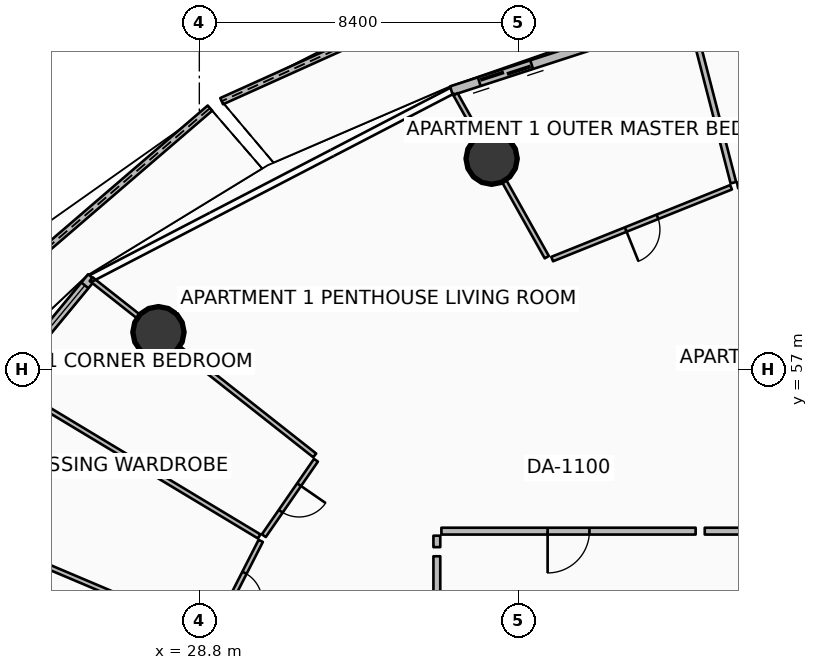
"""IFC4 building model, lengths in metres.
Left out: names, types, materials, properties, quantities, classifications, styles, units other than length and angle.
Written with IfcOpenShell. Run it as: python <this file> out.ifc"""

import sys

from ifc_helpers import new_model, si_unit, direction, frame, frame_2d, origin, origin_2d, place, context, subcontext, project, spatial, polyline, rectangle, circle, outline, extrude, element, fill, save


model = new_model("IFC4")
c1 = context("Model", 3, precision=1e-05, world=origin(), true_north=direction((0.0, 1.0)))
c2 = subcontext(c1, "Body", "Model", "MODEL_VIEW")
j1 = project(units=[si_unit("LENGTHUNIT", "METRE"), si_unit("PLANEANGLEUNIT", "RADIAN")], contexts=[c1])
p1 = place(None, origin())
s1 = spatial("IfcSite", under=j1, at=p1, CompositionType="ELEMENT")
p2 = place(p1, origin())
s2 = spatial("IfcBuilding", under=s1, at=p2, CompositionType="ELEMENT")
p3 = place(p2, frame((0.0, 0.0, 30.15)))
s3 = spatial("IfcBuildingStorey", under=s2, at=p3, CompositionType="ELEMENT", Elevation=30.15)
for number, where, z_axis, x_axis in (
    (1, (36.492, 62.55, 0.0), (0.0, 0.0, 1.0), (1.0, 0.0, 0.0)),
    (2, (27.724, 57.984, 0.0), (0.0, 0.0, 1.0), (1.0, 0.0, 0.0)),
):
    element("IfcColumn", number, at=place(p3, frame(where, z_axis=z_axis, x_axis=x_axis)), inside=s3, PredefinedType="COLUMN", context=c2, shape_type="SweptSolid", body=[
        extrude(circle(Radius=0.675, at=origin_2d()), origin(), (0.0, 0.0, 1.0), 3.5),
    ])
p4 = place(p3, frame((39.26, 68.514, 0.0), z_axis=(0.0, 0.0, 1.0), x_axis=(-0.911628502068, -0.411015175167, 0.0)))
e3 = element("IfcWall", 3, at=p4, inside=s3, PredefinedType="PARAPET", context=c2, shape_type="SweptSolid", body=[
    extrude(outline(polyline([(0.0, 0.0), (10.829, 0.0), (10.829, 1.497), (5.414, 1.696), (0.0, 1.832), (0.0, 0.0)])), frame((0.0, 0.09, 0.0), z_axis=(0.0, -1.0, 0.0), x_axis=(1.0, 0.0, 0.0)), (0.0, 0.0, 1.0), 0.18),
])
p5 = place(p3, frame((29.08, 63.881, 0.0), z_axis=(0.0, 0.0, 1.0), x_axis=(-0.758371329303, -0.651822772609, 0.0)))
e4 = element("IfcWall", 4, at=p5, inside=s3, PredefinedType="PARAPET", context=c2, shape_type="SweptSolid", body=[
    extrude(outline(polyline([(0.0, 0.0), (11.67, 0.0), (11.67, 1.148), (5.835, 1.284), (0.0, 1.483), (0.0, 0.0)])), frame((0.0, 0.09, 0.0), z_axis=(0.0, -1.0, 0.0), x_axis=(1.0, 0.0, 0.0)), (0.0, 0.0, 1.0), 0.18),
])
p6 = place(p3, frame((45.036, 67.458, 0.0), z_axis=(0.0, 0.0, 1.0), x_axis=(-0.951054679225, -0.309022648238, 0.0)))
e5 = element("IfcWall", 5, at=p6, inside=s3, PredefinedType="SOLIDWALL", context=c2, shape_type="SweptSolid", body=[
    extrude(rectangle(XDim=10.097, YDim=0.24, at=frame_2d((5.048, 0.0))), origin(), (0.0, 0.0, 1.0), 2.45),
])
p7 = place(p6, frame((7.877, 0.0, 0.0)))
e6 = element("IfcOpeningElement", 6, at=p7, cuts=e5, PredefinedType="OPENING", context=c2, shape_type="SweptSolid", body=[
    extrude(rectangle(XDim=1.45, YDim=2.15, at=frame_2d((0.725, 1.075))), frame((0.0, 0.13, 0.0), z_axis=(0.0, -1.0, 0.0), x_axis=(1.0, 0.0, 0.0)), (0.0, 0.0, 1.0), 0.26),
])
p8 = place(p6, frame((0.28, 0.0, 0.65)))
e7 = element("IfcOpeningElement", 7, at=p8, cuts=e5, PredefinedType="OPENING", context=c2, shape_type="SweptSolid", body=[
    extrude(rectangle(XDim=1.6, YDim=1.5, at=frame_2d((0.8, 0.75))), frame((0.0, 0.13, 0.0), z_axis=(0.0, -1.0, 0.0), x_axis=(1.0, 0.0, 0.0)), (0.0, 0.0, 1.0), 0.26),
])
p9 = place(p3, frame((25.967, 59.433, 0.0), z_axis=(0.0, 0.0, 1.0), x_axis=(-0.636674332663, -0.771132799281, 0.0)))
e8 = element("IfcWall", 8, at=p9, inside=s3, PredefinedType="SOLIDWALL", context=c2, shape_type="SweptSolid", body=[
    extrude(rectangle(XDim=11.851, YDim=0.24, at=frame_2d((5.926, 0.0))), origin(), (0.0, 0.0, 1.0), 2.45),
])
p10 = place(p9, frame((9.631, 0.0, 0.0)))
e9 = element("IfcOpeningElement", 9, at=p10, cuts=e8, PredefinedType="OPENING", context=c2, shape_type="SweptSolid", body=[
    extrude(rectangle(XDim=1.45, YDim=2.15, at=frame_2d((0.725, 1.075))), frame((0.0, 0.13, 0.0), z_axis=(0.0, -1.0, 0.0), x_axis=(1.0, 0.0, 0.0)), (0.0, 0.0, 1.0), 0.26),
])
p11 = place(p9, frame((0.28, 0.0, 0.65)))
e10 = element("IfcOpeningElement", 10, at=p11, cuts=e8, PredefinedType="OPENING", context=c2, shape_type="SweptSolid", body=[
    extrude(rectangle(XDim=1.6, YDim=1.5, at=frame_2d((0.8, 0.75))), frame((0.0, 0.13, 0.0), z_axis=(0.0, -1.0, 0.0), x_axis=(1.0, 0.0, 0.0)), (0.0, 0.0, 1.0), 0.26),
])
p12 = place(p3, frame((41.86, 52.75, 0.0), z_axis=(0.0, 0.0, 1.0), x_axis=(-1.0, 0.0, 0.0)))
e11 = element("IfcWall", 11, at=p12, inside=s3, PredefinedType="PARTITIONING", context=c2, shape_type="SweptSolid", body=[
    extrude(rectangle(XDim=6.69, YDim=0.18, at=frame_2d((3.345, 0.0))), origin(), (0.0, 0.0, 1.0), 2.867),
])
p13 = place(p12, frame((2.795, 0.0, 0.0)))
e12 = element("IfcOpeningElement", 12, at=p13, cuts=e11, PredefinedType="OPENING", context=c2, shape_type="SweptSolid", body=[
    extrude(rectangle(XDim=1.1, YDim=2.1, at=frame_2d((0.55, 1.05))), frame((0.0, 0.1, 0.0), z_axis=(0.0, -1.0, 0.0), x_axis=(1.0, 0.0, 0.0)), (0.0, 0.0, 1.0), 0.2),
])
p14 = place(p3, frame((35.05, 52.63, 0.0), z_axis=(0.0, 0.0, 1.0), x_axis=(0.0, -1.0, 0.0)))
e13 = element("IfcWall", 13, at=p14, inside=s3, PredefinedType="PARTITIONING", context=c2, shape_type="SweptSolid", body=[
    extrude(rectangle(XDim=0.301, YDim=0.18, at=frame_2d((0.15, 0.0))), origin(), (0.0, 0.0, 1.0), 2.867),
])
p15 = place(p3, frame((46.608, 52.75, 0.0), z_axis=(0.0, 0.0, 1.0), x_axis=(-1.0, 0.0, 0.0)))
e14 = element("IfcWall", 14, at=p15, inside=s3, PredefinedType="PARTITIONING", context=c2, shape_type="SweptSolid", body=[
    extrude(rectangle(XDim=4.508, YDim=0.18, at=frame_2d((2.254, 0.0))), origin(), (0.0, 0.0, 1.0), 2.867),
])
p16 = place(p3, frame((37.943, 59.958, 0.0), z_axis=(0.0, 0.0, 1.0), x_axis=(-0.488606395453, 0.872504321091, 0.0)))
e15 = element("IfcWall", 15, at=p16, inside=s3, PredefinedType="PARTITIONING", context=c2, shape_type="SweptSolid", body=[
    extrude(rectangle(XDim=4.913, YDim=0.125, at=frame_2d((2.457, 0.0))), origin(), (0.0, 0.0, 1.0), 2.867),
])
p17 = place(p3, frame((45.494, 62.323, 0.0), z_axis=(0.0, 0.0, 1.0), x_axis=(-0.982882919375, -0.184231286161, 0.0)))
e16 = element("IfcWall", 16, at=p17, inside=s3, PredefinedType="PARTITIONING", context=c2, shape_type="SweptSolid", body=[
    extrude(rectangle(XDim=2.575, YDim=0.15, at=frame_2d((1.288, 0.0))), origin(), (0.0, 0.0, 1.0), 2.867),
])
p18 = place(p17, frame((0.862, 0.0, 0.0)))
e17 = element("IfcOpeningElement", 17, at=p18, cuts=e16, PredefinedType="OPENING", context=c2, shape_type="SweptSolid", body=[
    extrude(rectangle(XDim=0.85, YDim=2.06, at=frame_2d((0.425, 1.03))), frame((0.0, 0.085, 0.0), z_axis=(0.0, -1.0, 0.0), x_axis=(1.0, 0.0, 0.0)), (0.0, 0.0, 1.0), 0.17),
])
p19 = place(p3, frame((42.852, 61.919, 0.0), z_axis=(0.0, 0.0, 1.0), x_axis=(-0.250174852853, 0.968200672898, 0.0)))
e18 = element("IfcWall", 18, at=p19, inside=s3, PredefinedType="PARTITIONING", context=c2, shape_type="SweptSolid", body=[
    extrude(rectangle(XDim=4.477, YDim=0.15, at=frame_2d((2.239, 0.0))), origin(), (0.0, 0.0, 1.0), 2.94),
])
p20 = place(p3, frame((42.792, 61.798, 0.0), z_axis=(0.0, 0.0, 1.0), x_axis=(-0.928027868691, -0.372510771566, 0.0)))
e19 = element("IfcWall", 19, at=p20, inside=s3, PredefinedType="PARTITIONING", context=c2, shape_type="SweptSolid", body=[
    extrude(rectangle(XDim=5.072, YDim=0.125, at=frame_2d((2.536, 0.0))), origin(), (0.0, 0.0, 1.0), 2.867),
])
p21 = place(p20, frame((2.086, 0.0, 0.0)))
e20 = element("IfcOpeningElement", 20, at=p21, cuts=e19, PredefinedType="OPENING", context=c2, shape_type="SweptSolid", body=[
    extrude(rectangle(XDim=0.9, YDim=2.08, at=frame_2d((0.45, 1.04))), frame((0.0, 0.073, 0.0), z_axis=(0.0, -1.0, 0.0), x_axis=(1.0, 0.0, 0.0)), (0.0, 0.0, 1.0), 0.145),
])
p22 = place(p3, frame((35.05, 52.089, 0.0), z_axis=(0.0, 0.0, 1.0), x_axis=(0.0, -1.0, 0.0)))
e21 = element("IfcWall", 21, at=p22, inside=s3, PredefinedType="PARTITIONING", context=c2, shape_type="SweptSolid", body=[
    extrude(rectangle(XDim=6.317, YDim=0.18, at=frame_2d((3.158, 0.0))), origin(), (0.0, 0.0, 1.0), 2.867),
])
p23 = place(p3, frame((31.836, 54.743, 0.0), z_axis=(0.0, 0.0, 1.0), x_axis=(-0.785333171854, 0.619073347178, 0.0)))
e22 = element("IfcWall", 22, at=p23, inside=s3, PredefinedType="PARTITIONING", context=c2, shape_type="SweptSolid", body=[
    extrude(rectangle(XDim=7.489, YDim=0.125, at=frame_2d((3.745, 0.0))), origin(), (0.0, 0.0, 1.0), 2.867),
])
p24 = place(p3, frame((30.375, 52.611, 0.0), z_axis=(0.0, 0.0, 1.0), x_axis=(-0.856697740307, 0.515818748936, 0.0)))
e23 = element("IfcWall", 23, at=p24, inside=s3, PredefinedType="PARTITIONING", context=c2, shape_type="SweptSolid", body=[
    extrude(rectangle(XDim=7.704, YDim=0.125, at=frame_2d((3.852, 0.0))), origin(), (0.0, 0.0, 1.0), 2.94),
])
p25 = place(p3, frame((29.055, 50.022, 0.0), z_axis=(0.0, 0.0, 1.0), x_axis=(-0.920841617163, 0.389936810395, 0.0)))
e24 = element("IfcWall", 24, at=p25, inside=s3, PredefinedType="PARTITIONING", context=c2, shape_type="SweptSolid", body=[
    extrude(rectangle(XDim=8.613, YDim=0.125, at=frame_2d((4.306, 0.0))), origin(), (0.0, 0.0, 1.0), 2.94),
])
p26 = place(p3, frame((31.869, 54.615, 0.0), z_axis=(0.0, 0.0, 1.0), x_axis=(-0.568588801709, -0.822621890404, 0.0)))
e25 = element("IfcWall", 25, at=p26, inside=s3, PredefinedType="PARTITIONING", context=c2, shape_type="SweptSolid", body=[
    extrude(rectangle(XDim=2.412, YDim=0.125, at=frame_2d((1.206, 0.0))), origin(), (0.0, 0.0, 1.0), 2.867),
])
p27 = place(p26, frame((0.781, 0.0, 0.0)))
e26 = element("IfcOpeningElement", 26, at=p27, cuts=e25, PredefinedType="OPENING", context=c2, shape_type="SweptSolid", body=[
    extrude(rectangle(XDim=0.85, YDim=2.06, at=frame_2d((0.425, 1.03))), frame((0.0, 0.073, 0.0), z_axis=(0.0, -1.0, 0.0), x_axis=(1.0, 0.0, 0.0)), (0.0, 0.0, 1.0), 0.145),
])
p28 = place(p3, frame((30.416, 52.493, 0.0), z_axis=(0.0, 0.0, 1.0), x_axis=(-0.454024795493, -0.890989048798, 0.0)))
e27 = element("IfcWall", 27, at=p28, inside=s3, PredefinedType="PARTITIONING", context=c2, shape_type="SweptSolid", body=[
    extrude(rectangle(XDim=2.733, YDim=0.125, at=frame_2d((1.367, 0.0))), origin(), (0.0, 0.0, 1.0), 2.94),
])
p29 = place(p28, frame((0.942, 0.0, 0.0)))
e28 = element("IfcOpeningElement", 28, at=p29, cuts=e27, PredefinedType="OPENING", context=c2, shape_type="SweptSolid", body=[
    extrude(rectangle(XDim=0.85, YDim=2.06, at=frame_2d((0.425, 1.03))), frame((0.0, 0.073, 0.0), z_axis=(0.0, -1.0, 0.0), x_axis=(1.0, 0.0, 0.0)), (0.0, 0.0, 1.0), 0.145),
])
p30 = place(p7, origin())
e29 = element("IfcDoor", 29, at=p30, inside=s3, OperationType="DOUBLE_DOOR_SLIDING", PredefinedType="DOOR", context=c2, shape_type="SweptSolid", body=[
    extrude(rectangle(XDim=1.45, YDim=2.15, at=frame_2d((0.725, 1.075))), frame((0.0, 0.025, 0.0), z_axis=(0.0, -1.0, 0.0), x_axis=(1.0, 0.0, 0.0)), (0.0, 0.0, 1.0), 0.05),
])
fill(e6, e29)
p31 = place(p11, origin())
e30 = element("IfcWindow", 30, at=p31, inside=s3, PartitioningType="SINGLE_PANEL", PredefinedType="WINDOW", context=c2, shape_type="SweptSolid", body=[
    extrude(rectangle(XDim=1.6, YDim=1.5, at=frame_2d((0.8, 0.75))), frame((0.0, 0.03, 0.0), z_axis=(0.0, -1.0, 0.0), x_axis=(1.0, 0.0, 0.0)), (0.0, 0.0, 1.0), 0.06),
])
fill(e10, e30)
p32 = place(p13, origin())
e31 = element("IfcDoor", 31, at=p32, inside=s3, OperationType="SINGLE_SWING_RIGHT", PredefinedType="DOOR", context=c2, shape_type="SweptSolid", body=[
    extrude(rectangle(XDim=1.1, YDim=2.1, at=frame_2d((0.55, 1.05))), frame((0.0, 0.025, 0.0), z_axis=(0.0, -1.0, 0.0), x_axis=(1.0, 0.0, 0.0)), (0.0, 0.0, 1.0), 0.05),
])
fill(e12, e31)
p33 = place(p21, origin())
e32 = element("IfcDoor", 32, at=p33, inside=s3, OperationType="SINGLE_SWING_RIGHT", PredefinedType="DOOR", context=c2, shape_type="SweptSolid", body=[
    extrude(rectangle(XDim=0.9, YDim=2.08, at=frame_2d((0.45, 1.04))), frame((0.0, 0.025, 0.0), z_axis=(0.0, -1.0, 0.0), x_axis=(1.0, 0.0, 0.0)), (0.0, 0.0, 1.0), 0.05),
])
fill(e20, e32)
p34 = place(p27, origin())
e33 = element("IfcDoor", 33, at=p34, inside=s3, OperationType="SINGLE_SWING_LEFT", PredefinedType="DOOR", context=c2, shape_type="SweptSolid", body=[
    extrude(rectangle(XDim=0.85, YDim=2.06, at=frame_2d((0.425, 1.03))), frame((0.0, 0.025, 0.0), z_axis=(0.0, -1.0, 0.0), x_axis=(1.0, 0.0, 0.0)), (0.0, 0.0, 1.0), 0.05),
])
fill(e26, e33)
p35 = place(p29, origin())
e34 = element("IfcDoor", 34, at=p35, inside=s3, OperationType="SINGLE_SWING_RIGHT", PredefinedType="DOOR", context=c2, shape_type="SweptSolid", body=[
    extrude(rectangle(XDim=0.85, YDim=2.06, at=frame_2d((0.425, 1.03))), frame((0.0, 0.025, 0.0), z_axis=(0.0, -1.0, 0.0), x_axis=(1.0, 0.0, 0.0)), (0.0, 0.0, 1.0), 0.05),
])
fill(e28, e34)
save(model, sys.argv[1])
